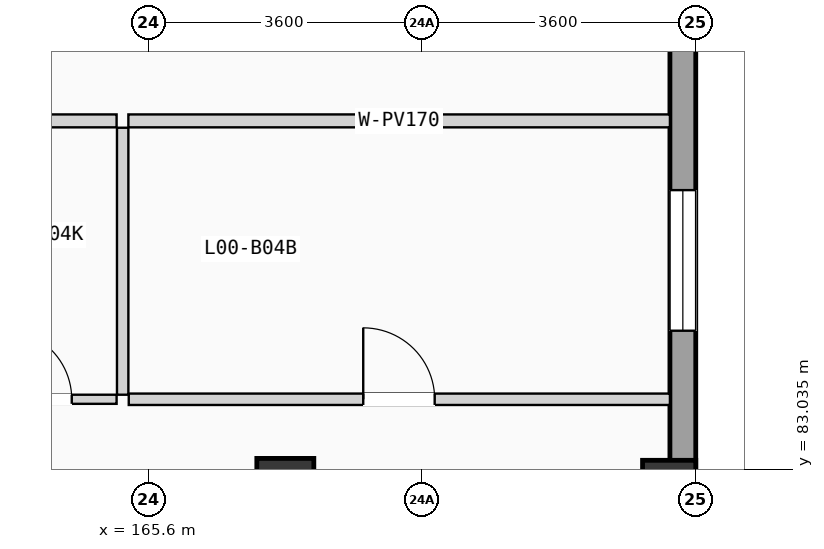
"""IFC4 building model, lengths in metres.
Left out: names, types, materials, properties, quantities, classifications, styles, units other than length and angle.
Written with IfcOpenShell. Run it as: python <this file> out.ifc"""

import sys

from ifc_helpers import new_model, si_unit, direction, frame, frame_2d, origin, origin_2d, place, context, subcontext, project, spatial, rectangle, extrude, element, fill, save


model = new_model("IFC4")
c1 = context("Model", 3, precision=1e-05, world=origin(), true_north=direction((0.0, 1.0)))
c2 = subcontext(c1, "Body", "Model", "MODEL_VIEW")
j1 = project(units=[si_unit("LENGTHUNIT", "METRE"), si_unit("PLANEANGLEUNIT", "RADIAN")], contexts=[c1])
p1 = place(None, origin())
s1 = spatial("IfcSite", under=j1, at=p1, CompositionType="ELEMENT")
p2 = place(p1, origin())
s2 = spatial("IfcBuilding", under=s1, at=p2, CompositionType="ELEMENT")
p3 = place(p2, origin())
s3 = spatial("IfcBuildingStorey", under=s2, at=p3, CompositionType="ELEMENT", Elevation=0.0)
p4 = place(p3, frame((167.4, 82.8, 0.0), z_axis=(0.0, 0.0, 1.0), x_axis=(1.0, 0.0, 0.0)))
e1 = element("IfcColumn", 1, at=p4, inside=s3, PredefinedType="COLUMN", context=c2, shape_type="SweptSolid", body=[
    extrude(rectangle(XDim=0.75, YDim=0.75, at=origin_2d()), origin(), (0.0, 0.0, 1.0), 4.9),
])
p5 = place(p3, frame((172.45, 82.8, 0.0), z_axis=(0.0, 0.0, 1.0), x_axis=(1.0, 0.0, 0.0)))
e2 = element("IfcColumn", 2, at=p5, inside=s3, PredefinedType="COLUMN", context=c2, shape_type="SweptSolid", body=[
    extrude(rectangle(XDim=0.7, YDim=0.7, at=origin_2d()), origin(), (0.0, 0.0, 1.0), 4.9),
])
p6 = place(p3, frame((172.63, 68.74, 0.0), z_axis=(0.0, 0.0, 1.0), x_axis=(0.0, 1.0, 0.0)))
e3 = element("IfcWall", 3, at=p6, inside=s3, PredefinedType="SOLIDWALL", context=c2, shape_type="SweptSolid", body=[
    extrude(rectangle(XDim=49.72, YDim=0.34, at=frame_2d((24.86, 0.0))), origin(), (0.0, 0.0, 1.0), 4.64),
])
p7 = place(p6, frame((23.96, 0.0, 0.0)))
e4 = element("IfcOpeningElement", 4, at=p7, cuts=e3, PredefinedType="OPENING", context=c2, shape_type="SweptSolid", body=[
    extrude(rectangle(XDim=1.8, YDim=2.35, at=frame_2d((0.9, 1.175))), frame((0.0, 0.18, 0.0), z_axis=(0.0, -1.0, 0.0), x_axis=(1.0, 0.0, 0.0)), (0.0, 0.0, 1.0), 0.36),
])
p8 = place(p6, frame((11.427, 0.0, 0.9)))
e5 = element("IfcOpeningElement", 5, at=p8, cuts=e3, PredefinedType="OPENING", context=c2, shape_type="SweptSolid", body=[
    extrude(rectangle(XDim=1.85, YDim=1.5, at=frame_2d((0.925, 0.75))), frame((0.0, 0.18, 0.0), z_axis=(0.0, -1.0, 0.0), x_axis=(1.0, 0.0, 0.0)), (0.0, 0.0, 1.0), 0.36),
])
p9 = place(p6, frame((8.082, 0.0, 0.9)))
e6 = element("IfcOpeningElement", 6, at=p9, cuts=e3, PredefinedType="OPENING", context=c2, shape_type="SweptSolid", body=[
    extrude(rectangle(XDim=1.85, YDim=1.65, at=frame_2d((0.925, 0.825))), frame((0.0, 0.18, 0.0), z_axis=(0.0, -1.0, 0.0), x_axis=(1.0, 0.0, 0.0)), (0.0, 0.0, 1.0), 0.36),
])
p10 = place(p6, frame((16.115, 0.0, 0.9)))
e7 = element("IfcOpeningElement", 7, at=p10, cuts=e3, PredefinedType="OPENING", context=c2, shape_type="SweptSolid", body=[
    extrude(rectangle(XDim=1.85, YDim=1.8, at=frame_2d((0.925, 0.9))), frame((0.0, 0.18, 0.0), z_axis=(0.0, -1.0, 0.0), x_axis=(1.0, 0.0, 0.0)), (0.0, 0.0, 1.0), 0.36),
])
p11 = place(p6, frame((36.368, 0.0, 0.9)))
e8 = element("IfcOpeningElement", 8, at=p11, cuts=e3, PredefinedType="OPENING", context=c2, shape_type="SweptSolid", body=[
    extrude(rectangle(XDim=2.0, YDim=1.2, at=frame_2d((1.0, 0.6))), frame((0.0, 0.18, 0.0), z_axis=(0.0, -1.0, 0.0), x_axis=(1.0, 0.0, 0.0)), (0.0, 0.0, 1.0), 0.36),
])
p12 = place(p6, frame((31.681, 0.0, 0.9)))
e9 = element("IfcOpeningElement", 9, at=p12, cuts=e3, PredefinedType="OPENING", context=c2, shape_type="SweptSolid", body=[
    extrude(rectangle(XDim=2.0, YDim=1.35, at=frame_2d((1.0, 0.675))), frame((0.0, 0.18, 0.0), z_axis=(0.0, -1.0, 0.0), x_axis=(1.0, 0.0, 0.0)), (0.0, 0.0, 1.0), 0.36),
])
p13 = place(p6, frame((39.713, 0.0, 0.9)))
e10 = element("IfcOpeningElement", 10, at=p13, cuts=e3, PredefinedType="OPENING", context=c2, shape_type="SweptSolid", body=[
    extrude(rectangle(XDim=2.0, YDim=1.5, at=frame_2d((1.0, 0.75))), frame((0.0, 0.18, 0.0), z_axis=(0.0, -1.0, 0.0), x_axis=(1.0, 0.0, 0.0)), (0.0, 0.0, 1.0), 0.36),
])
p14 = place(p3, frame((163.073, 83.953, 0.0), z_axis=(0.0, 0.0, 1.0), x_axis=(1.0, 0.0, 0.0)))
e11 = element("IfcWall", 11, at=p14, inside=s3, PredefinedType="PARTITIONING", context=c2, shape_type="SweptSolid", body=[
    extrude(rectangle(XDim=2.107, YDim=0.12, at=frame_2d((1.053, 0.0))), origin(), (0.0, 0.0, 1.0), 3.84),
])
p15 = place(p14, frame((0.597, 0.0, 0.0)))
e12 = element("IfcOpeningElement", 12, at=p15, cuts=e11, PredefinedType="OPENING", context=c2, shape_type="SweptSolid", body=[
    extrude(rectangle(XDim=0.92, YDim=2.02, at=frame_2d((0.46, 1.01))), frame((0.0, 0.07, 0.0), z_axis=(0.0, -1.0, 0.0), x_axis=(1.0, 0.0, 0.0)), (0.0, 0.0, 1.0), 0.14),
])
p16 = place(p3, frame((165.34, 83.953, 0.0), z_axis=(0.0, 0.0, 1.0), x_axis=(1.0, 0.0, 0.0)))
e13 = element("IfcWall", 13, at=p16, inside=s3, PredefinedType="PARTITIONING", context=c2, shape_type="SweptSolid", body=[
    extrude(rectangle(XDim=7.12, YDim=0.15, at=frame_2d((3.56, 0.0))), origin(), (0.0, 0.0, 1.0), 3.84),
])
p17 = place(p16, frame((3.085, 0.0, 0.0)))
e14 = element("IfcOpeningElement", 14, at=p17, cuts=e13, PredefinedType="OPENING", context=c2, shape_type="SweptSolid", body=[
    extrude(rectangle(XDim=0.94, YDim=2.06, at=frame_2d((0.47, 1.03))), frame((0.0, 0.085, 0.0), z_axis=(0.0, -1.0, 0.0), x_axis=(1.0, 0.0, 0.0)), (0.0, 0.0, 1.0), 0.17),
])
p18 = place(p3, frame((165.26, 84.013, 0.0), z_axis=(0.0, 0.0, 1.0), x_axis=(0.0, 1.0, 0.0)))
e15 = element("IfcWall", 15, at=p18, inside=s3, PredefinedType="PARTITIONING", context=c2, shape_type="SweptSolid", body=[
    extrude(rectangle(XDim=3.513, YDim=0.15, at=frame_2d((1.756, 0.0))), origin(), (0.0, 0.0, 1.0), 3.84),
])
p19 = place(p3, frame((163.073, 87.616, 0.0), z_axis=(0.0, 0.0, 1.0), x_axis=(1.0, 0.0, 0.0)))
e16 = element("IfcWall", 16, at=p19, inside=s3, PredefinedType="PARTITIONING", context=c2, shape_type="SweptSolid", body=[
    extrude(rectangle(XDim=2.107, YDim=0.17, at=frame_2d((1.053, 0.0))), origin(), (0.0, 0.0, 1.0), 3.84),
])
p20 = place(p3, frame((165.335, 87.616, 0.0), z_axis=(0.0, 0.0, 1.0), x_axis=(1.0, 0.0, 0.0)))
e17 = element("IfcWall", 17, at=p20, inside=s3, PredefinedType="PARTITIONING", context=c2, shape_type="SweptSolid", body=[
    extrude(rectangle(XDim=7.125, YDim=0.17, at=frame_2d((3.562, 0.0))), origin(), (0.0, 0.0, 1.0), 3.84),
])
p21 = place(p10, origin())
e18 = element("IfcWindow", 18, at=p21, inside=s3, PartitioningType="DOUBLE_PANEL_VERTICAL", PredefinedType="WINDOW", context=c2, shape_type="SweptSolid", body=[
    extrude(rectangle(XDim=1.85, YDim=1.8, at=frame_2d((0.925, 0.9))), frame((0.0, 0.03, 0.0), z_axis=(0.0, -1.0, 0.0), x_axis=(1.0, 0.0, 0.0)), (0.0, 0.0, 1.0), 0.06),
])
fill(e7, e18)
p22 = place(p15, origin())
e19 = element("IfcDoor", 19, at=p22, inside=s3, OperationType="SINGLE_SWING_LEFT", PredefinedType="DOOR", context=c2, shape_type="SweptSolid", body=[
    extrude(rectangle(XDim=0.92, YDim=2.02, at=frame_2d((0.46, 1.01))), frame((0.0, 0.025, 0.0), z_axis=(0.0, -1.0, 0.0), x_axis=(1.0, 0.0, 0.0)), (0.0, 0.0, 1.0), 0.05),
])
fill(e12, e19)
p23 = place(p17, origin())
e20 = element("IfcDoor", 20, at=p23, inside=s3, OperationType="SINGLE_SWING_LEFT", PredefinedType="DOOR", context=c2, shape_type="SweptSolid", body=[
    extrude(rectangle(XDim=0.94, YDim=2.06, at=frame_2d((0.47, 1.03))), frame((0.0, 0.025, 0.0), z_axis=(0.0, -1.0, 0.0), x_axis=(1.0, 0.0, 0.0)), (0.0, 0.0, 1.0), 0.05),
])
fill(e14, e20)
save(model, sys.argv[1])
